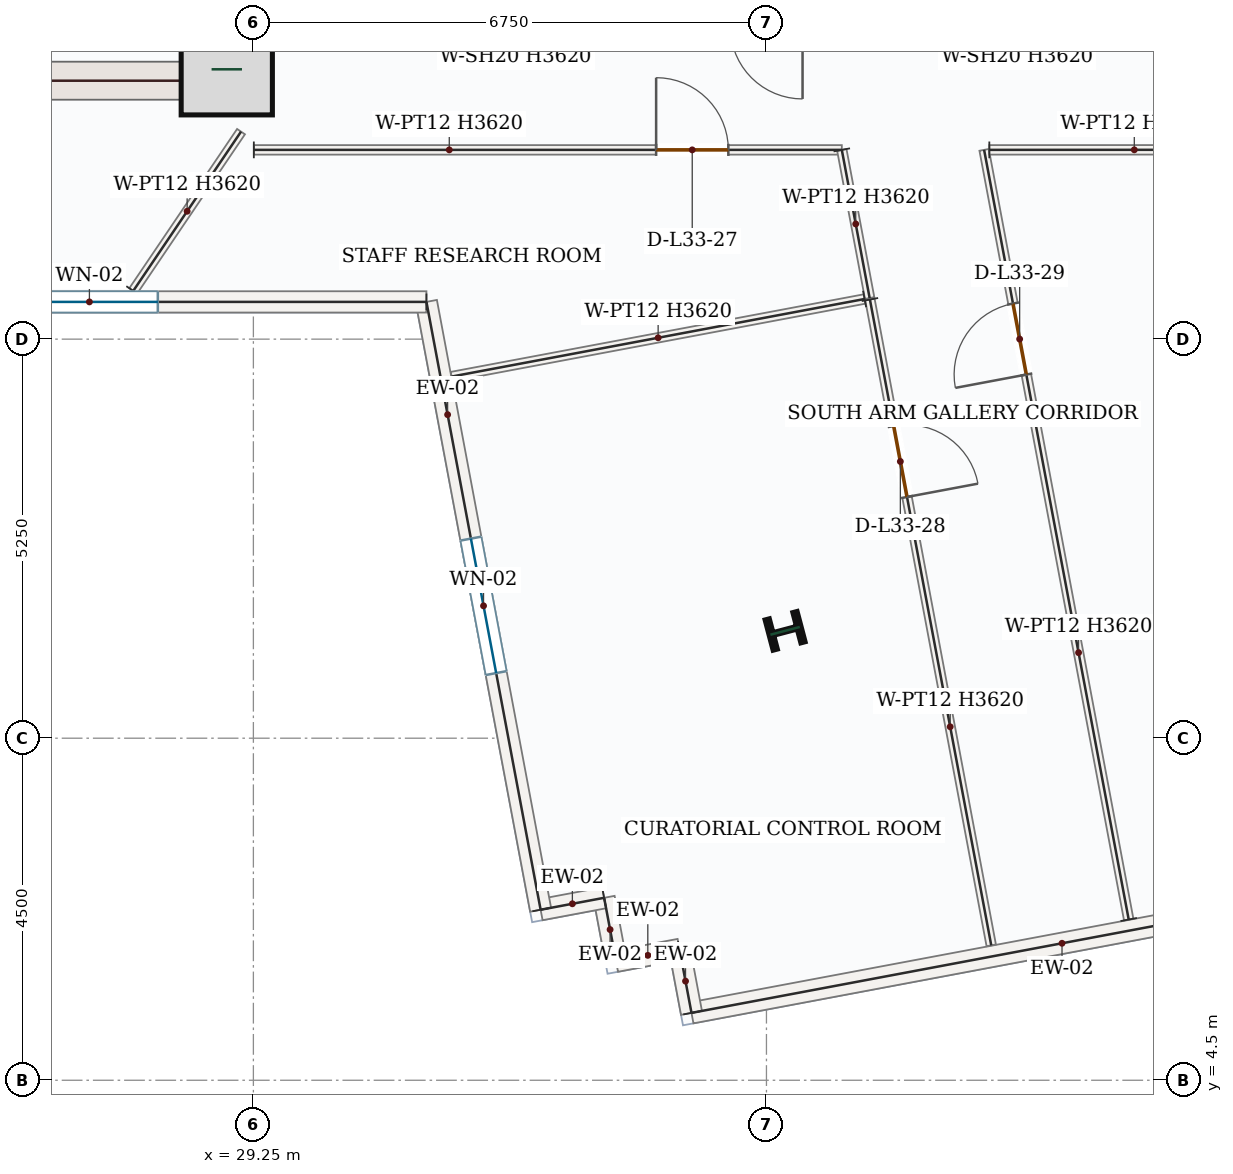
"""IFC4 building model, lengths in metres.
Left out: names, types, materials, properties, quantities, classifications, styles, units other than length and angle.
Written with IfcOpenShell. Run it as: python <this file> out.ifc"""

import sys

from ifc_helpers import new_model, si_unit, direction, frame, frame_2d, origin, origin_2d, place, context, subcontext, project, spatial, rectangle, i_section, extrude, source, transform, mapped, element, fill, save


model = new_model("IFC4")
c1 = context("Model", 3, precision=1e-05, world=origin(), true_north=direction((0.0, 1.0)))
c2 = subcontext(c1, "Body", "Model", "MODEL_VIEW")
j1 = project(units=[si_unit("LENGTHUNIT", "METRE"), si_unit("PLANEANGLEUNIT", "RADIAN")], contexts=[c1])
p1 = place(None, origin())
s1 = spatial("IfcSite", under=j1, at=p1, CompositionType="ELEMENT")
p2 = place(p1, origin())
s2 = spatial("IfcBuilding", under=s1, at=p2, CompositionType="ELEMENT")
p3 = place(p2, frame((0.0, 0.0, 147.3)))
s3 = spatial("IfcBuildingStorey", under=s2, at=p3, CompositionType="ELEMENT", Elevation=147.3)
p4 = place(p3, frame((29.0, 17.4, 0.0), z_axis=(0.0, 0.0, 1.0), x_axis=(0.0, 1.0, 0.0)))
e1 = element("IfcWall", 1, at=p4, inside=s3, PredefinedType="SHEAR", context=c2, shape_type="SweptSolid", body=[
    extrude(rectangle(XDim=8.55, YDim=0.5, at=frame_2d((4.275, 0.0))), origin(), (0.0, 0.0, 1.0), 3.62),
])
p5 = place(p4, frame((6.65, 0.0, 0.0)))
e2 = element("IfcOpeningElement", 2, at=p5, cuts=e1, PredefinedType="OPENING", context=c2, shape_type="SweptSolid", body=[
    extrude(rectangle(XDim=1.1, YDim=2.2, at=frame_2d((0.55, 1.1))), frame((0.0, 0.26, 0.0), z_axis=(0.0, -1.0, 0.0), x_axis=(1.0, 0.0, 0.0)), (0.0, 0.0, 1.0), 0.52),
])
p6 = place(p4, frame((3.15, 0.0, 0.0)))
e3 = element("IfcOpeningElement", 3, at=p6, cuts=e1, PredefinedType="OPENING", context=c2, shape_type="SweptSolid", body=[
    extrude(rectangle(XDim=0.88, YDim=2.1, at=frame_2d((0.44, 1.05))), frame((0.0, 0.26, 0.0), z_axis=(0.0, -1.0, 0.0), x_axis=(1.0, 0.0, 0.0)), (0.0, 0.0, 1.0), 0.52),
])
m1 = source(origin(), c2, "Body", "SweptSolid", [
    extrude(rectangle(XDim=7.0, YDim=0.5, at=frame_2d((3.5, 0.0))), origin(), (0.0, 0.0, 1.0), 3.62),
])
p7 = place(p3, frame((21.75, 17.65, 0.0), z_axis=(0.0, 0.0, 1.0), x_axis=(1.0, 0.0, 0.0)))
e4 = element("IfcWall", 4, at=p7, inside=s3, PredefinedType="SHEAR", context=c2, shape_type="MappedRepresentation", body=[
    mapped(m1, transform((0.0, 0.0, 0.0), x_axis=(1.0, 0.0, 0.0), y_axis=(0.0, 1.0, 0.0), z_axis=(0.0, 0.0, 1.0), scale=1.0)),
])
m2 = source(origin(), c2, "Body", "SweptSolid", [
    extrude(rectangle(XDim=1.2, YDim=1.2, at=origin_2d()), origin(), (0.0, 0.0, 1.0), 3.9),
])
p8 = place(p3, frame((28.9, 17.8, 0.0), z_axis=(0.0, 0.0, 1.0), x_axis=(1.0, 0.0, 0.0)))
e5 = element("IfcColumn", 5, at=p8, inside=s3, PredefinedType="COLUMN", context=c2, shape_type="MappedRepresentation", body=[
    mapped(m2, transform((0.0, 0.0, 0.0), x_axis=(1.0, 0.0, 0.0), y_axis=(0.0, 1.0, 0.0), z_axis=(0.0, 0.0, 1.0), scale=1.0)),
])
m3 = source(origin(), c2, "Body", "SweptSolid", [
    extrude(i_section(OverallWidth=0.412, OverallDepth=0.435, WebThickness=0.036, FlangeThickness=0.057, FilletRadius=0.018, at=origin_2d()), origin(), (0.0, 0.0, 1.0), 3.9),
])
p9 = place(p3, frame((36.245, 10.412, 0.0), z_axis=(0.0, 0.0, 1.0), x_axis=(-0.255445757936, 0.966823388604, 0.0)))
e6 = element("IfcColumn", 6, at=p9, inside=s3, PredefinedType="COLUMN", context=c2, shape_type="MappedRepresentation", body=[
    mapped(m3, transform((0.0, 0.0, 0.0), x_axis=(1.0, 0.0, 0.0), y_axis=(0.0, 1.0, 0.0), z_axis=(0.0, 0.0, 1.0), scale=1.0)),
])
m4 = source(origin(), c2, "Body", "SweptSolid", [
    extrude(rectangle(XDim=9.92, YDim=0.28, at=frame_2d((4.96, 0.0))), origin(), (0.0, 0.0, 1.0), 3.62),
])
p10 = place(p3, frame((44.763, 7.218, 0.0), z_axis=(0.0, 0.0, 1.0), x_axis=(-0.982807207568, -0.184634754994, 0.0)))
e7 = element("IfcWall", 7, at=p10, inside=s3, PredefinedType="SOLIDWALL", context=c2, shape_type="MappedRepresentation", body=[
    mapped(m4, transform((0.0, 0.0, 0.0), x_axis=(1.0, 0.0, 0.0), y_axis=(0.0, 1.0, 0.0), z_axis=(0.0, 0.0, 1.0), scale=1.0)),
])
m5 = source(origin(), c2, "Body", "SweptSolid", [
    extrude(rectangle(XDim=0.85, YDim=0.28, at=frame_2d((0.425, 0.0))), origin(), (0.0, 0.0, 1.0), 3.62),
])
for number, where, z_axis, x_axis in (
    (8, (35.014, 5.386, 0.0), (0.0, 0.0, 1.0), (-0.185, 0.983, 0.0)),
    (9, (34.857, 6.222, 0.0), (0.0, 0.0, 1.0), (-0.983, -0.185, 0.0)),
    (10, (34.021, 6.065, 0.0), (0.0, 0.0, 1.0), (-0.185, 0.983, 0.0)),
    (11, (33.865, 6.9, 0.0), (0.0, 0.0, 1.0), (-0.983, -0.185, 0.0)),
):
    element("IfcWall", number, at=place(p3, frame(where, z_axis=z_axis, x_axis=x_axis)), inside=s3, PredefinedType="SOLIDWALL", context=c2, shape_type="MappedRepresentation", body=[
        mapped(m5, transform((0.0, 0.0, 0.0), x_axis=(1.0, 0.0, 0.0), y_axis=(0.0, 1.0, 0.0), z_axis=(0.0, 0.0, 1.0), scale=1.0)),
    ])
p11 = place(p3, frame((33.029, 6.743, 0.0), z_axis=(0.0, 0.0, 1.0), x_axis=(-0.184649032166, 0.982804525285, 0.0)))
e12 = element("IfcWall", 12, at=p11, inside=s3, PredefinedType="SOLIDWALL", context=c2, shape_type="SweptSolid", body=[
    extrude(rectangle(XDim=8.137, YDim=0.28, at=frame_2d((4.068, 0.0))), origin(), (0.0, 0.0, 1.0), 3.62),
])
p12 = place(p11, frame((3.168, 0.0, 0.85)))
e13 = element("IfcOpeningElement", 13, at=p12, cuts=e12, PredefinedType="OPENING", context=c2, shape_type="SweptSolid", body=[
    extrude(rectangle(XDim=1.8, YDim=1.75, at=frame_2d((0.9, 0.875))), frame((0.0, 0.15, 0.0), z_axis=(0.0, -1.0, 0.0), x_axis=(1.0, 0.0, 0.0)), (0.0, 0.0, 1.0), 0.3),
])
p13 = place(p3, frame((31.527, 14.74, 0.0), z_axis=(0.0, 0.0, 1.0), x_axis=(-1.0, 0.0, 0.0)))
e14 = element("IfcWall", 14, at=p13, inside=s3, PredefinedType="SOLIDWALL", context=c2, shape_type="SweptSolid", body=[
    extrude(rectangle(XDim=8.869, YDim=0.28, at=frame_2d((4.434, 0.0))), origin(), (0.0, 0.0, 1.0), 3.62),
])
p14 = place(p13, frame((3.534, 0.0, 0.85)))
e15 = element("IfcOpeningElement", 15, at=p14, cuts=e14, PredefinedType="OPENING", context=c2, shape_type="SweptSolid", body=[
    extrude(rectangle(XDim=1.8, YDim=1.75, at=frame_2d((0.9, 0.875))), frame((0.0, 0.15, 0.0), z_axis=(0.0, -1.0, 0.0), x_axis=(1.0, 0.0, 0.0)), (0.0, 0.0, 1.0), 0.3),
])
p15 = place(p3, frame((29.256, 16.74, 0.0), z_axis=(0.0, 0.0, 1.0), x_axis=(1.0, 0.0, 0.0)))
e16 = element("IfcWall", 16, at=p15, inside=s3, PredefinedType="PARTITIONING", context=c2, shape_type="SweptSolid", body=[
    extrude(rectangle(XDim=7.736, YDim=0.125, at=frame_2d((3.868, 0.0))), origin(), (0.0, 0.0, 1.0), 3.62),
])
p16 = place(p15, frame((5.293, 0.0, 0.0)))
e17 = element("IfcOpeningElement", 17, at=p16, cuts=e16, PredefinedType="OPENING", context=c2, shape_type="SweptSolid", body=[
    extrude(rectangle(XDim=0.95, YDim=2.15, at=frame_2d((0.475, 1.075))), frame((0.0, 0.073, 0.0), z_axis=(0.0, -1.0, 0.0), x_axis=(1.0, 0.0, 0.0)), (0.0, 0.0, 1.0), 0.145),
])
m6 = source(origin(), c2, "Body", "SweptSolid", [
    extrude(rectangle(XDim=1.983, YDim=0.125, at=frame_2d((0.992, 0.0))), origin(), (0.0, 0.0, 1.0), 3.62),
])
p17 = place(p3, frame((36.991, 16.74, 0.0), z_axis=(0.0, 0.0, 1.0), x_axis=(0.184645271511, -0.982805231828, 0.0)))
e18 = element("IfcWall", 18, at=p17, inside=s3, PredefinedType="PARTITIONING", context=c2, shape_type="MappedRepresentation", body=[
    mapped(m6, transform((0.0, 0.0, 0.0), x_axis=(1.0, 0.0, 0.0), y_axis=(0.0, 1.0, 0.0), z_axis=(0.0, 0.0, 1.0), scale=1.0)),
])
m7 = source(origin(), c2, "Body", "SweptSolid", [
    extrude(rectangle(XDim=5.527, YDim=0.125, at=frame_2d((2.764, 0.0))), origin(), (0.0, 0.0, 1.0), 3.62),
])
p18 = place(p3, frame((37.291, 14.778, 0.0), z_axis=(0.0, 0.0, 1.0), x_axis=(-0.982808624954, -0.184627210117, 0.0)))
e19 = element("IfcWall", 19, at=p18, inside=s3, PredefinedType="PARTITIONING", context=c2, shape_type="MappedRepresentation", body=[
    mapped(m7, transform((0.0, 0.0, 0.0), x_axis=(1.0, 0.0, 0.0), y_axis=(0.0, 1.0, 0.0), z_axis=(0.0, 0.0, 1.0), scale=1.0)),
])
m8 = source(origin(), c2, "Body", "SweptSolid", [
    extrude(rectangle(XDim=2.53, YDim=0.125, at=frame_2d((1.265, 0.0))), origin(), (0.0, 0.0, 1.0), 3.62),
])
p19 = place(p3, frame((27.67, 14.885, 0.0), z_axis=(0.0, 0.0, 1.0), x_axis=(0.560455418396, 0.82818459536, 0.0)))
e20 = element("IfcWall", 20, at=p19, inside=s3, PredefinedType="PARTITIONING", context=c2, shape_type="MappedRepresentation", body=[
    mapped(m8, transform((0.0, 0.0, 0.0), x_axis=(1.0, 0.0, 0.0), y_axis=(0.0, 1.0, 0.0), z_axis=(0.0, 0.0, 1.0), scale=1.0)),
])
p20 = place(p3, frame((37.361, 14.771, 0.0), z_axis=(0.0, 0.0, 1.0), x_axis=(0.18463806937, -0.982806584908, 0.0)))
e21 = element("IfcWall", 21, at=p20, inside=s3, PredefinedType="PARTITIONING", context=c2, shape_type="SweptSolid", body=[
    extrude(rectangle(XDim=8.645, YDim=0.125, at=frame_2d((4.323, 0.0))), origin(), (0.0, 0.0, 1.0), 3.62),
])
p21 = place(p20, frame((1.693, 0.0, 0.0)))
e22 = element("IfcOpeningElement", 22, at=p21, cuts=e21, PredefinedType="OPENING", context=c2, shape_type="SweptSolid", body=[
    extrude(rectangle(XDim=0.95, YDim=2.15, at=frame_2d((0.475, 1.075))), frame((0.0, 0.073, 0.0), z_axis=(0.0, -1.0, 0.0), x_axis=(1.0, 0.0, 0.0)), (0.0, 0.0, 1.0), 0.145),
])
p22 = place(p3, frame((40.766, 6.615, 0.0), z_axis=(0.0, 0.0, 1.0), x_axis=(-0.184646211839, 0.982805055163, 0.0)))
e23 = element("IfcWall", 23, at=p22, inside=s3, PredefinedType="PARTITIONING", context=c2, shape_type="SweptSolid", body=[
    extrude(rectangle(XDim=10.303, YDim=0.125, at=frame_2d((5.151, 0.0))), origin(), (0.0, 0.0, 1.0), 3.62),
])
p23 = place(p22, frame((7.295, 0.0, 0.0)))
e24 = element("IfcOpeningElement", 24, at=p23, cuts=e23, PredefinedType="OPENING", context=c2, shape_type="SweptSolid", body=[
    extrude(rectangle(XDim=0.95, YDim=2.15, at=frame_2d((0.475, 1.075))), frame((0.0, 0.073, 0.0), z_axis=(0.0, -1.0, 0.0), x_axis=(1.0, 0.0, 0.0)), (0.0, 0.0, 1.0), 0.145),
])
m9 = source(origin(), c2, "Body", "SweptSolid", [
    extrude(rectangle(XDim=3.814, YDim=0.125, at=frame_2d((1.907, 0.0))), origin(), (0.0, 0.0, 1.0), 3.149),
])
p24 = place(p3, frame((38.932, 16.74, 0.0), z_axis=(0.0, 0.0, 1.0), x_axis=(0.999999948787, 0.000320040949, 0.0)))
e25 = element("IfcWall", 25, at=p24, inside=s3, PredefinedType="PARTITIONING", context=c2, shape_type="MappedRepresentation", body=[
    mapped(m9, transform((0.0, 0.0, 0.0), x_axis=(1.0, 0.0, 0.0), y_axis=(0.0, 1.0, 0.0), z_axis=(0.0, 0.0, 1.0), scale=1.0)),
])
m10 = source(origin(), c2, "Body", "SweptSolid", [
    extrude(rectangle(XDim=1.8, YDim=1.75, at=frame_2d((0.9, 0.875))), frame((0.0, 0.03, 0.0), z_axis=(0.0, -1.0, 0.0), x_axis=(1.0, 0.0, 0.0)), (0.0, 0.0, 1.0), 0.06),
])
p25 = place(p12, origin())
e26 = element("IfcWindow", 26, at=p25, inside=s3, PartitioningType="DOUBLE_PANEL_VERTICAL", PredefinedType="WINDOW", context=c2, shape_type="MappedRepresentation", body=[
    mapped(m10, transform((0.0, 0.0, 0.0), x_axis=(1.0, 0.0, 0.0), y_axis=(0.0, 1.0, 0.0), z_axis=(0.0, 0.0, 1.0), scale=1.0)),
])
fill(e13, e26)
p26 = place(p14, origin())
e27 = element("IfcWindow", 27, at=p26, inside=s3, PartitioningType="DOUBLE_PANEL_VERTICAL", PredefinedType="WINDOW", context=c2, shape_type="MappedRepresentation", body=[
    mapped(m10, transform((0.0, 0.0, 0.0), x_axis=(1.0, 0.0, 0.0), y_axis=(0.0, 1.0, 0.0), z_axis=(0.0, 0.0, 1.0), scale=1.0)),
])
fill(e15, e27)
m11 = source(origin(), c2, "Body", "SweptSolid", [
    extrude(rectangle(XDim=0.95, YDim=2.15, at=frame_2d((0.475, 1.075))), frame((0.0, 0.025, 0.0), z_axis=(0.0, -1.0, 0.0), x_axis=(1.0, 0.0, 0.0)), (0.0, 0.0, 1.0), 0.05),
])
p27 = place(p16, origin())
e28 = element("IfcDoor", 28, at=p27, inside=s3, OperationType="SINGLE_SWING_LEFT", PredefinedType="DOOR", context=c2, shape_type="MappedRepresentation", body=[
    mapped(m11, transform((0.0, 0.0, 0.0), x_axis=(1.0, 0.0, 0.0), y_axis=(0.0, 1.0, 0.0), z_axis=(0.0, 0.0, 1.0), scale=1.0)),
])
fill(e17, e28)
p28 = place(p21, origin())
e29 = element("IfcDoor", 29, at=p28, inside=s3, OperationType="SINGLE_SWING_RIGHT", PredefinedType="DOOR", context=c2, shape_type="MappedRepresentation", body=[
    mapped(m11, transform((0.0, 0.0, 0.0), x_axis=(1.0, 0.0, 0.0), y_axis=(0.0, 1.0, 0.0), z_axis=(0.0, 0.0, 1.0), scale=1.0)),
])
fill(e22, e29)
p29 = place(p23, origin())
e30 = element("IfcDoor", 30, at=p29, inside=s3, OperationType="SINGLE_SWING_LEFT", PredefinedType="DOOR", context=c2, shape_type="MappedRepresentation", body=[
    mapped(m11, transform((0.0, 0.0, 0.0), x_axis=(1.0, 0.0, 0.0), y_axis=(0.0, 1.0, 0.0), z_axis=(0.0, 0.0, 1.0), scale=1.0)),
])
fill(e24, e30)
save(model, sys.argv[1])
